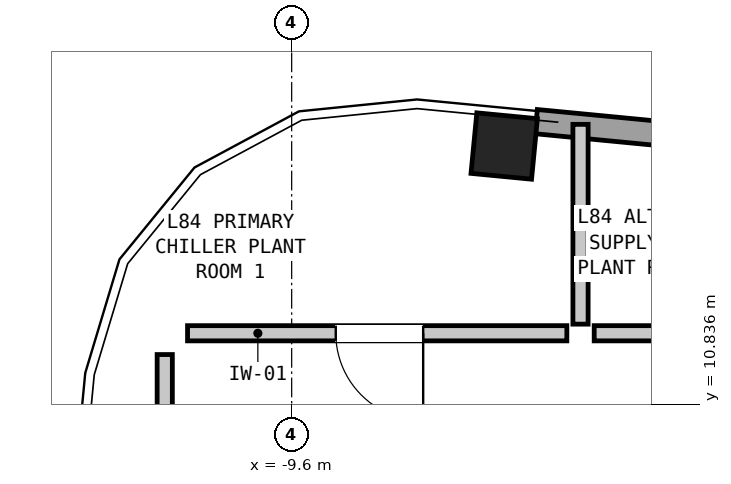
"""IFC4 building model, lengths in metres.
Left out: names, types, materials, properties, quantities, classifications, styles, units other than length and angle.
Written with IfcOpenShell. Run it as: python <this file> out.ifc"""

import sys

from ifc_helpers import new_model, si_unit, direction, frame, frame_2d, origin, origin_2d, place, context, subcontext, project, spatial, rectangle, extrude, element, fill, save


model = new_model("IFC4")
c1 = context("Model", 3, precision=1e-05, world=origin(), true_north=direction((0.0, 1.0)))
c2 = subcontext(c1, "Body", "Model", "MODEL_VIEW")
j1 = project(units=[si_unit("LENGTHUNIT", "METRE"), si_unit("PLANEANGLEUNIT", "RADIAN")], contexts=[c1])
p1 = place(None, origin())
s1 = spatial("IfcSite", under=j1, at=p1, CompositionType="ELEMENT")
p2 = place(p1, origin())
s2 = spatial("IfcBuilding", under=s1, at=p2, CompositionType="ELEMENT")
p3 = place(p2, frame((0.0, 0.0, 284.9)))
s3 = spatial("IfcBuildingStorey", under=s2, at=p3, CompositionType="ELEMENT", Elevation=284.9)
p4 = place(p3, frame((-6.804, 14.233, 0.0), z_axis=(0.0, 0.0, 1.0), x_axis=(0.995396198367, -0.09584575252, 0.0)))
e1 = element("IfcColumn", 1, at=p4, inside=s3, PredefinedType="COLUMN", context=c2, shape_type="SweptSolid", body=[
    extrude(rectangle(XDim=0.8, YDim=0.8, at=origin_2d()), origin(), (0.0, 0.0, 1.0), 4.35),
])
p5 = place(p3, frame((-6.383, 14.554, 0.0), z_axis=(0.0, 0.0, 1.0), x_axis=(0.995396520412, -0.095842407898, 0.0)))
e2 = element("IfcWall", 2, at=p5, inside=s3, PredefinedType="SOLIDWALL", context=c2, shape_type="SweptSolid", body=[
    extrude(rectangle(XDim=23.224, YDim=0.32, at=frame_2d((11.612, 0.0))), origin(), (0.0, 0.0, 1.0), 2.25),
])
p6 = place(p3, frame((-5.98, 11.77, 0.0), z_axis=(0.0, 0.0, 1.0), x_axis=(-1.0, 0.0, 0.0)))
e3 = element("IfcWall", 3, at=p6, inside=s3, PredefinedType="PARTITIONING", context=c2, shape_type="SweptSolid", body=[
    extrude(rectangle(XDim=4.99, YDim=0.2, at=frame_2d((2.495, 0.0))), origin(), (0.0, 0.0, 1.0), 4.07),
])
p7 = place(p6, frame((1.89, 0.0, 0.0)))
e4 = element("IfcOpeningElement", 4, at=p7, cuts=e3, PredefinedType="OPENING", context=c2, shape_type="SweptSolid", body=[
    extrude(rectangle(XDim=1.15, YDim=2.1, at=frame_2d((0.575, 1.05))), frame((0.0, 0.112, 0.0), z_axis=(0.0, -1.0, 0.0), x_axis=(1.0, 0.0, 0.0)), (0.0, 0.0, 1.0), 0.224),
])
p8 = place(p3, frame((-5.8, 11.89, 0.0), z_axis=(0.0, 0.0, 1.0), x_axis=(0.0, 1.0, 0.0)))
e5 = element("IfcWall", 5, at=p8, inside=s3, PredefinedType="PARTITIONING", context=c2, shape_type="SweptSolid", body=[
    extrude(rectangle(XDim=2.628, YDim=0.2, at=frame_2d((1.314, 0.0))), origin(), (0.0, 0.0, 1.0), 2.25),
])
p9 = place(p3, frame((-0.53, 11.77, 0.0), z_axis=(0.0, 0.0, 1.0), x_axis=(-1.0, 0.0, 0.0)))
e6 = element("IfcWall", 6, at=p9, inside=s3, PredefinedType="PARTITIONING", context=c2, shape_type="SweptSolid", body=[
    extrude(rectangle(XDim=5.09, YDim=0.2, at=frame_2d((2.545, 0.0))), origin(), (0.0, 0.0, 1.0), 2.932),
])
p10 = place(p9, frame((1.97, 0.0, 0.0)))
e7 = element("IfcOpeningElement", 7, at=p10, cuts=e6, PredefinedType="OPENING", context=c2, shape_type="SweptSolid", body=[
    extrude(rectangle(XDim=1.15, YDim=2.1, at=frame_2d((0.575, 1.05))), frame((0.0, 0.112, 0.0), z_axis=(0.0, -1.0, 0.0), x_axis=(1.0, 0.0, 0.0)), (0.0, 0.0, 1.0), 0.224),
])
p11 = place(p3, frame((-11.27, 11.49, 0.0), z_axis=(0.0, 0.0, 1.0), x_axis=(0.0, -1.0, 0.0)))
e8 = element("IfcWall", 8, at=p11, inside=s3, PredefinedType="PARTITIONING", context=c2, shape_type="SweptSolid", body=[
    extrude(rectangle(XDim=10.68, YDim=0.2, at=frame_2d((5.34, 0.0))), origin(), (0.0, 0.0, 1.0), 2.25),
])
p12 = place(p11, frame((4.765, 0.0, 0.0)))
e9 = element("IfcOpeningElement", 9, at=p12, cuts=e8, PredefinedType="OPENING", context=c2, shape_type="SweptSolid", body=[
    extrude(rectangle(XDim=1.15, YDim=2.1, at=frame_2d((0.575, 1.05))), frame((0.0, 0.112, 0.0), z_axis=(0.0, -1.0, 0.0), x_axis=(1.0, 0.0, 0.0)), (0.0, 0.0, 1.0), 0.224),
])
p13 = place(p7, origin())
e10 = element("IfcDoor", 10, at=p13, inside=s3, OperationType="SINGLE_SWING_LEFT", PredefinedType="DOOR", context=c2, shape_type="SweptSolid", body=[
    extrude(rectangle(XDim=1.15, YDim=2.1, at=frame_2d((0.575, 1.05))), frame((0.0, 0.025, 0.0), z_axis=(0.0, -1.0, 0.0), x_axis=(1.0, 0.0, 0.0)), (0.0, 0.0, 1.0), 0.05),
])
fill(e4, e10)
save(model, sys.argv[1])
